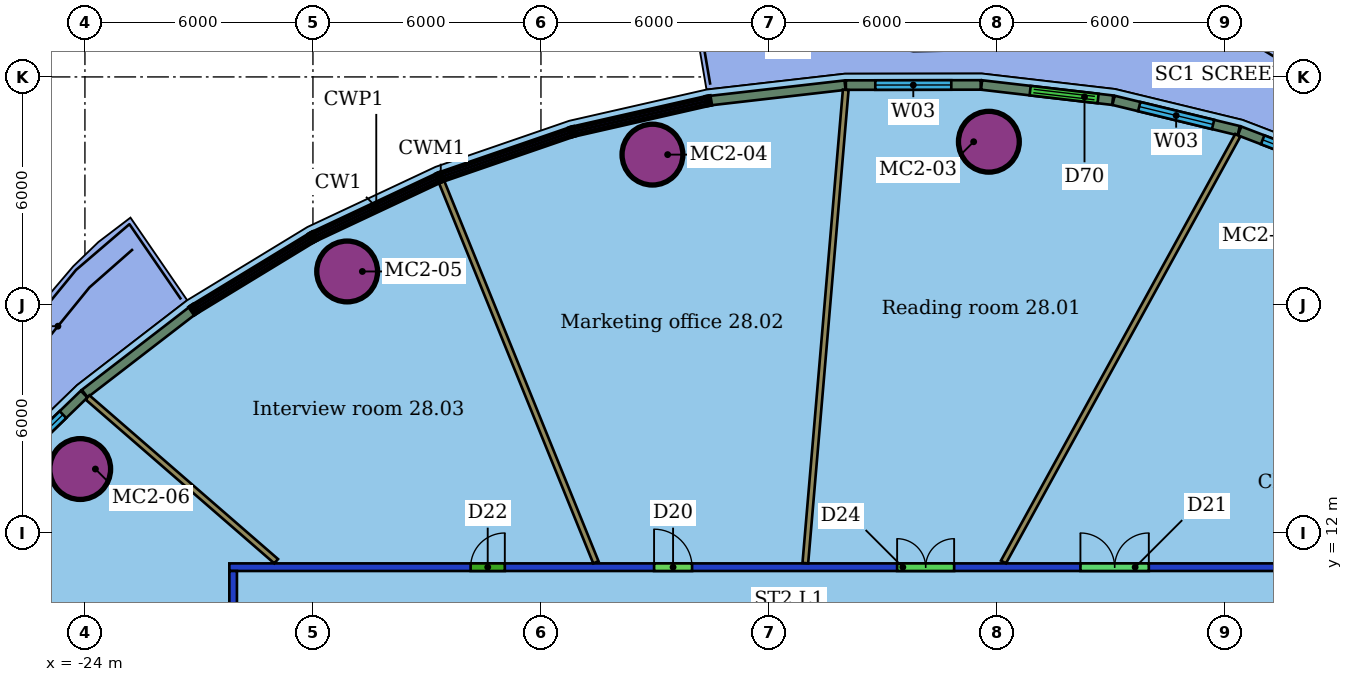
"""IFC4 building model, lengths in metres.
Left out: names, types, materials, properties, quantities, classifications, styles, units other than length and angle.
Written with IfcOpenShell. Run it as: python <this file> out.ifc"""

import sys

from ifc_helpers import new_model, si_unit, direction, frame, frame_2d, origin, origin_2d, place, context, subcontext, project, spatial, rectangle, hollow_circle, extrude, element, fill, save


model = new_model("IFC4")
c1 = context("Model", 3, precision=1e-05, world=origin(), true_north=direction((0.0, 1.0)))
c2 = subcontext(c1, "Body", "Model", "MODEL_VIEW")
j1 = project(units=[si_unit("LENGTHUNIT", "METRE"), si_unit("PLANEANGLEUNIT", "RADIAN")], contexts=[c1])
p1 = place(None, origin())
s1 = spatial("IfcSite", under=j1, at=p1, CompositionType="ELEMENT")
p2 = place(p1, origin())
s2 = spatial("IfcBuilding", under=s1, at=p2, CompositionType="ELEMENT")
p3 = place(p2, frame((0.0, 0.0, 121.0)))
s3 = spatial("IfcBuildingStorey", under=s2, at=p3, CompositionType="ELEMENT", Elevation=121.0)
for number, where, z_axis, x_axis in (
    (1, (-0.213, 22.294, 0.0), (0.0, 0.0, 1.0), (1.0, 0.0, 0.0)),
    (2, (-9.066, 21.956, 0.0), (0.0, 0.0, 1.0), (1.0, 0.0, 0.0)),
    (3, (-17.1, 18.881, 0.0), (0.0, 0.0, 1.0), (1.0, 0.0, 0.0)),
    (4, (-24.125, 13.683, 0.0), (0.0, 0.0, 1.0), (1.0, 0.0, 0.0)),
):
    element("IfcColumn", number, at=place(p3, frame(where, z_axis=z_axis, x_axis=x_axis)), inside=s3, PredefinedType="COLUMN", context=c2, shape_type="SweptSolid", body=[
        extrude(hollow_circle(Radius=0.8, WallThickness=0.055, at=origin_2d()), origin(), (0.0, 0.0, 1.0), 3.45),
    ])
p4 = place(p3, frame((-20.1, -11.0, 0.0), z_axis=(0.0, 0.0, 1.0), x_axis=(0.0, 1.0, 0.0)))
e5 = element("IfcWall", 5, at=p4, inside=s3, PredefinedType="PARTITIONING", context=c2, shape_type="SweptSolid", body=[
    extrude(rectangle(XDim=22.0, YDim=0.2, at=frame_2d((11.0, 0.0))), origin(), (0.0, 0.0, 1.0), 3.0),
])
p5 = place(p4, frame((15.966, 0.0, 0.0)))
e6 = element("IfcOpeningElement", 6, at=p5, cuts=e5, PredefinedType="OPENING", context=c2, shape_type="SweptSolid", body=[
    extrude(rectangle(XDim=1.0, YDim=2.1, at=frame_2d((0.5, 1.05))), frame((0.0, 0.11, 0.0), z_axis=(0.0, -1.0, 0.0), x_axis=(1.0, 0.0, 0.0)), (0.0, 0.0, 1.0), 0.22),
])
p6 = place(p4, frame((11.613, 0.0, 0.0)))
e7 = element("IfcOpeningElement", 7, at=p6, cuts=e5, PredefinedType="OPENING", context=c2, shape_type="SweptSolid", body=[
    extrude(rectangle(XDim=1.0, YDim=2.4, at=frame_2d((0.5, 1.2))), frame((0.0, 0.11, 0.0), z_axis=(0.0, -1.0, 0.0), x_axis=(1.0, 0.0, 0.0)), (0.0, 0.0, 1.0), 0.22),
])
p7 = place(p4, frame((6.341, 0.0, 0.0)))
e8 = element("IfcOpeningElement", 8, at=p7, cuts=e5, PredefinedType="OPENING", context=c2, shape_type="SweptSolid", body=[
    extrude(rectangle(XDim=1.8, YDim=2.4, at=frame_2d((0.9, 1.2))), frame((0.0, 0.11, 0.0), z_axis=(0.0, -1.0, 0.0), x_axis=(1.0, 0.0, 0.0)), (0.0, 0.0, 1.0), 0.22),
])
p8 = place(p3, frame((-20.2, 11.1, 0.0), z_axis=(0.0, 0.0, 1.0), x_axis=(1.0, 0.0, 0.0)))
e9 = element("IfcWall", 9, at=p8, inside=s3, PredefinedType="PARTITIONING", context=c2, shape_type="SweptSolid", body=[
    extrude(rectangle(XDim=28.4, YDim=0.2, at=frame_2d((14.2, 0.0))), origin(), (0.0, 0.0, 1.0), 3.0),
])
p9 = place(p8, frame((17.572, 0.0, 0.0)))
e10 = element("IfcOpeningElement", 10, at=p9, cuts=e9, PredefinedType="OPENING", context=c2, shape_type="SweptSolid", body=[
    extrude(rectangle(XDim=1.5, YDim=2.1, at=frame_2d((0.75, 1.05))), frame((0.0, 0.11, 0.0), z_axis=(0.0, -1.0, 0.0), x_axis=(1.0, 0.0, 0.0)), (0.0, 0.0, 1.0), 0.22),
])
p10 = place(p8, frame((11.177, 0.0, 0.0)))
e11 = element("IfcOpeningElement", 11, at=p10, cuts=e9, PredefinedType="OPENING", context=c2, shape_type="SweptSolid", body=[
    extrude(rectangle(XDim=1.0, YDim=2.1, at=frame_2d((0.5, 1.05))), frame((0.0, 0.11, 0.0), z_axis=(0.0, -1.0, 0.0), x_axis=(1.0, 0.0, 0.0)), (0.0, 0.0, 1.0), 0.22),
])
p11 = place(p8, frame((6.349, 0.0, 0.0)))
e12 = element("IfcOpeningElement", 12, at=p11, cuts=e9, PredefinedType="OPENING", context=c2, shape_type="SweptSolid", body=[
    extrude(rectangle(XDim=0.9, YDim=2.1, at=frame_2d((0.45, 1.05))), frame((0.0, 0.11, 0.0), z_axis=(0.0, -1.0, 0.0), x_axis=(1.0, 0.0, 0.0)), (0.0, 0.0, 1.0), 0.22),
])
p12 = place(p8, frame((22.396, 0.0, 0.0)))
e13 = element("IfcOpeningElement", 13, at=p12, cuts=e9, PredefinedType="OPENING", context=c2, shape_type="SweptSolid", body=[
    extrude(rectangle(XDim=1.8, YDim=2.1, at=frame_2d((0.9, 1.05))), frame((0.0, 0.11, 0.0), z_axis=(0.0, -1.0, 0.0), x_axis=(1.0, 0.0, 0.0)), (0.0, 0.0, 1.0), 0.22),
])
p13 = place(p3, frame((6.336, 22.463, 0.0), z_axis=(0.0, 0.0, 1.0), x_axis=(-0.481358172348, -0.876523992777, 0.0)))
e14 = element("IfcWall", 14, at=p13, inside=s3, PredefinedType="PARTITIONING", context=c2, shape_type="SweptSolid", body=[
    extrude(rectangle(XDim=12.809, YDim=0.15, at=frame_2d((6.404, 0.0))), origin(), (0.0, 0.0, 1.0), 3.45),
])
p14 = place(p3, frame((-3.98, 23.66, 0.0), z_axis=(0.0, 0.0, 1.0), x_axis=(-0.085065958211, -0.996375322232, 0.0)))
e15 = element("IfcWall", 15, at=p14, inside=s3, PredefinedType="PARTITIONING", context=c2, shape_type="SweptSolid", body=[
    extrude(rectangle(XDim=12.499, YDim=0.15, at=frame_2d((6.25, 0.0))), origin(), (0.0, 0.0, 1.0), 3.45),
])
p15 = place(p3, frame((-14.616, 21.239, 0.0), z_axis=(0.0, 0.0, 1.0), x_axis=(0.375913878844, -0.926654604312, 0.0)))
e16 = element("IfcWall", 16, at=p15, inside=s3, PredefinedType="PARTITIONING", context=c2, shape_type="SweptSolid", body=[
    extrude(rectangle(XDim=10.803, YDim=0.15, at=frame_2d((5.401, 0.0))), origin(), (0.0, 0.0, 1.0), 3.45),
])
p16 = place(p3, frame((-23.932, 15.566, 0.0), z_axis=(0.0, 0.0, 1.0), x_axis=(0.755165660984, -0.655533999477, 0.0)))
e17 = element("IfcWall", 17, at=p16, inside=s3, PredefinedType="PARTITIONING", context=c2, shape_type="SweptSolid", body=[
    extrude(rectangle(XDim=6.574, YDim=0.15, at=frame_2d((3.287, 0.0))), origin(), (0.0, 0.0, 1.0), 3.45),
])
p17 = place(p3, frame((9.464, 21.397, 0.0), z_axis=(0.0, 0.0, 1.0), x_axis=(-0.933724677667, 0.357991936103, 0.0)))
e18 = element("IfcWall", 18, at=p17, inside=s3, PredefinedType="SOLIDWALL", context=c2, shape_type="SweptSolid", body=[
    extrude(rectangle(XDim=3.299, YDim=0.25, at=frame_2d((1.649, 0.0))), origin(), (0.0, 0.0, 1.0), 3.05),
])
p18 = place(p17, frame((0.649, 0.0, 0.9)))
e19 = element("IfcOpeningElement", 19, at=p18, cuts=e18, PredefinedType="OPENING", context=c2, shape_type="SweptSolid", body=[
    extrude(rectangle(XDim=2.0, YDim=2.1, at=frame_2d((1.0, 1.05))), frame((0.0, 0.135, 0.0), z_axis=(0.0, -1.0, 0.0), x_axis=(1.0, 0.0, 0.0)), (0.0, 0.0, 1.0), 0.27),
])
p19 = place(p3, frame((6.361, 22.585, 0.0), z_axis=(0.0, 0.0, 1.0), x_axis=(-0.971871596081, 0.235511360088, 0.0)))
e20 = element("IfcWall", 20, at=p19, inside=s3, PredefinedType="SOLIDWALL", context=c2, shape_type="SweptSolid", body=[
    extrude(rectangle(XDim=3.389, YDim=0.25, at=frame_2d((1.694, 0.0))), origin(), (0.0, 0.0, 1.0), 3.05),
])
p20 = place(p19, frame((0.695, 0.0, 0.9)))
e21 = element("IfcOpeningElement", 21, at=p20, cuts=e20, PredefinedType="OPENING", context=c2, shape_type="SweptSolid", body=[
    extrude(rectangle(XDim=2.0, YDim=2.1, at=frame_2d((1.0, 1.05))), frame((0.0, 0.135, 0.0), z_axis=(0.0, -1.0, 0.0), x_axis=(1.0, 0.0, 0.0)), (0.0, 0.0, 1.0), 0.27),
])
p21 = place(p3, frame((3.045, 23.388, 0.0), z_axis=(0.0, 0.0, 1.0), x_axis=(-0.993327429038, 0.115328308409, 0.0)))
e22 = element("IfcWall", 22, at=p21, inside=s3, PredefinedType="SOLIDWALL", context=c2, shape_type="SweptSolid", body=[
    extrude(rectangle(XDim=3.474, YDim=0.25, at=frame_2d((1.737, 0.0))), origin(), (0.0, 0.0, 1.0), 3.05),
])
p22 = place(p21, frame((0.387, 0.0, 0.0)))
e23 = element("IfcOpeningElement", 23, at=p22, cuts=e22, PredefinedType="OPENING", context=c2, shape_type="SweptSolid", body=[
    extrude(rectangle(XDim=1.8, YDim=2.4, at=frame_2d((0.9, 1.2))), frame((0.0, 0.135, 0.0), z_axis=(0.0, -1.0, 0.0), x_axis=(1.0, 0.0, 0.0)), (0.0, 0.0, 1.0), 0.27),
])
p23 = place(p3, frame((-0.428, 23.79, 0.0), z_axis=(0.0, 0.0, 1.0), x_axis=(-0.999999145394, -0.001307368318, 0.0)))
e24 = element("IfcWall", 24, at=p23, inside=s3, PredefinedType="SOLIDWALL", context=c2, shape_type="SweptSolid", body=[
    extrude(rectangle(XDim=3.548, YDim=0.25, at=frame_2d((1.774, 0.0))), origin(), (0.0, 0.0, 1.0), 3.05),
])
p24 = place(p23, frame((0.774, 0.0, 0.9)))
e25 = element("IfcOpeningElement", 25, at=p24, cuts=e24, PredefinedType="OPENING", context=c2, shape_type="SweptSolid", body=[
    extrude(rectangle(XDim=2.0, YDim=2.1, at=frame_2d((1.0, 1.05))), frame((0.0, 0.135, 0.0), z_axis=(0.0, -1.0, 0.0), x_axis=(1.0, 0.0, 0.0)), (0.0, 0.0, 1.0), 0.27),
])
p25 = place(p3, frame((-3.998, 23.783, 0.0), z_axis=(0.0, 0.0, 1.0), x_axis=(-0.993503711569, -0.113799714842, 0.0)))
e26 = element("IfcWall", 26, at=p25, inside=s3, PredefinedType="SOLIDWALL", context=c2, shape_type="SweptSolid", body=[
    extrude(rectangle(XDim=3.563, YDim=0.25, at=frame_2d((1.782, 0.0))), origin(), (0.0, 0.0, 1.0), 3.05),
])
p26 = place(p3, frame((-21.183, 17.843, 0.0), z_axis=(0.0, 0.0, 1.0), x_axis=(-0.792037804, -0.610472044433, 0.0)))
e27 = element("IfcWall", 27, at=p26, inside=s3, PredefinedType="SOLIDWALL", context=c2, shape_type="SweptSolid", body=[
    extrude(rectangle(XDim=3.563, YDim=0.25, at=frame_2d((1.782, 0.0))), origin(), (0.0, 0.0, 1.0), 3.05),
])
p27 = place(p3, frame((-24.022, 15.653, 0.0), z_axis=(0.0, 0.0, 1.0), x_axis=(-0.718334776763, -0.695697598453, 0.0)))
e28 = element("IfcWall", 28, at=p27, inside=s3, PredefinedType="SOLIDWALL", context=c2, shape_type="SweptSolid", body=[
    extrude(rectangle(XDim=3.548, YDim=0.25, at=frame_2d((1.774, 0.0))), origin(), (0.0, 0.0, 1.0), 3.05),
])
p28 = place(p27, frame((0.774, 0.0, 0.9)))
e29 = element("IfcOpeningElement", 29, at=p28, cuts=e28, PredefinedType="OPENING", context=c2, shape_type="SweptSolid", body=[
    extrude(rectangle(XDim=2.0, YDim=2.1, at=frame_2d((1.0, 1.05))), frame((0.0, 0.135, 0.0), z_axis=(0.0, -1.0, 0.0), x_axis=(1.0, 0.0, 0.0)), (0.0, 0.0, 1.0), 0.27),
])
p29 = place(p9, origin())
e30 = element("IfcDoor", 30, at=p29, inside=s3, OperationType="DOUBLE_DOOR_SINGLE_SWING", PredefinedType="DOOR", context=c2, shape_type="SweptSolid", body=[
    extrude(rectangle(XDim=1.5, YDim=2.1, at=frame_2d((0.75, 1.05))), frame((0.0, 0.025, 0.0), z_axis=(0.0, -1.0, 0.0), x_axis=(1.0, 0.0, 0.0)), (0.0, 0.0, 1.0), 0.05),
])
fill(e10, e30)
p30 = place(p10, origin())
e31 = element("IfcDoor", 31, at=p30, inside=s3, OperationType="SINGLE_SWING_LEFT", PredefinedType="DOOR", context=c2, shape_type="SweptSolid", body=[
    extrude(rectangle(XDim=1.0, YDim=2.1, at=frame_2d((0.5, 1.05))), frame((0.0, 0.025, 0.0), z_axis=(0.0, -1.0, 0.0), x_axis=(1.0, 0.0, 0.0)), (0.0, 0.0, 1.0), 0.05),
])
fill(e11, e31)
p31 = place(p11, origin())
e32 = element("IfcDoor", 32, at=p31, inside=s3, OperationType="SINGLE_SWING_RIGHT", PredefinedType="DOOR", context=c2, shape_type="SweptSolid", body=[
    extrude(rectangle(XDim=0.9, YDim=2.1, at=frame_2d((0.45, 1.05))), frame((0.0, 0.025, 0.0), z_axis=(0.0, -1.0, 0.0), x_axis=(1.0, 0.0, 0.0)), (0.0, 0.0, 1.0), 0.05),
])
fill(e12, e32)
p32 = place(p12, origin())
e33 = element("IfcDoor", 33, at=p32, inside=s3, OperationType="DOUBLE_DOOR_SINGLE_SWING", PredefinedType="DOOR", context=c2, shape_type="SweptSolid", body=[
    extrude(rectangle(XDim=1.8, YDim=2.1, at=frame_2d((0.9, 1.05))), frame((0.0, 0.025, 0.0), z_axis=(0.0, -1.0, 0.0), x_axis=(1.0, 0.0, 0.0)), (0.0, 0.0, 1.0), 0.05),
])
fill(e13, e33)
p33 = place(p18, origin())
e34 = element("IfcWindow", 34, at=p33, inside=s3, PartitioningType="SINGLE_PANEL", PredefinedType="WINDOW", context=c2, shape_type="SweptSolid", body=[
    extrude(rectangle(XDim=2.0, YDim=2.1, at=frame_2d((1.0, 1.05))), frame((0.0, 0.03, 0.0), z_axis=(0.0, -1.0, 0.0), x_axis=(1.0, 0.0, 0.0)), (0.0, 0.0, 1.0), 0.06),
])
fill(e19, e34)
p34 = place(p20, origin())
e35 = element("IfcWindow", 35, at=p34, inside=s3, PartitioningType="SINGLE_PANEL", PredefinedType="WINDOW", context=c2, shape_type="SweptSolid", body=[
    extrude(rectangle(XDim=2.0, YDim=2.1, at=frame_2d((1.0, 1.05))), frame((0.0, 0.03, 0.0), z_axis=(0.0, -1.0, 0.0), x_axis=(1.0, 0.0, 0.0)), (0.0, 0.0, 1.0), 0.06),
])
fill(e21, e35)
p35 = place(p22, origin())
e36 = element("IfcDoor", 36, at=p35, inside=s3, OperationType="DOUBLE_DOOR_SLIDING", PredefinedType="DOOR", context=c2, shape_type="SweptSolid", body=[
    extrude(rectangle(XDim=1.8, YDim=2.4, at=frame_2d((0.9, 1.2))), frame((0.0, 0.025, 0.0), z_axis=(0.0, -1.0, 0.0), x_axis=(1.0, 0.0, 0.0)), (0.0, 0.0, 1.0), 0.05),
])
fill(e23, e36)
p36 = place(p24, origin())
e37 = element("IfcWindow", 37, at=p36, inside=s3, PartitioningType="SINGLE_PANEL", PredefinedType="WINDOW", context=c2, shape_type="SweptSolid", body=[
    extrude(rectangle(XDim=2.0, YDim=2.1, at=frame_2d((1.0, 1.05))), frame((0.0, 0.03, 0.0), z_axis=(0.0, -1.0, 0.0), x_axis=(1.0, 0.0, 0.0)), (0.0, 0.0, 1.0), 0.06),
])
fill(e25, e37)
p37 = place(p28, origin())
e38 = element("IfcWindow", 38, at=p37, inside=s3, PartitioningType="SINGLE_PANEL", PredefinedType="WINDOW", context=c2, shape_type="SweptSolid", body=[
    extrude(rectangle(XDim=2.0, YDim=2.1, at=frame_2d((1.0, 1.05))), frame((0.0, 0.03, 0.0), z_axis=(0.0, -1.0, 0.0), x_axis=(1.0, 0.0, 0.0)), (0.0, 0.0, 1.0), 0.06),
])
fill(e29, e38)
save(model, sys.argv[1])
